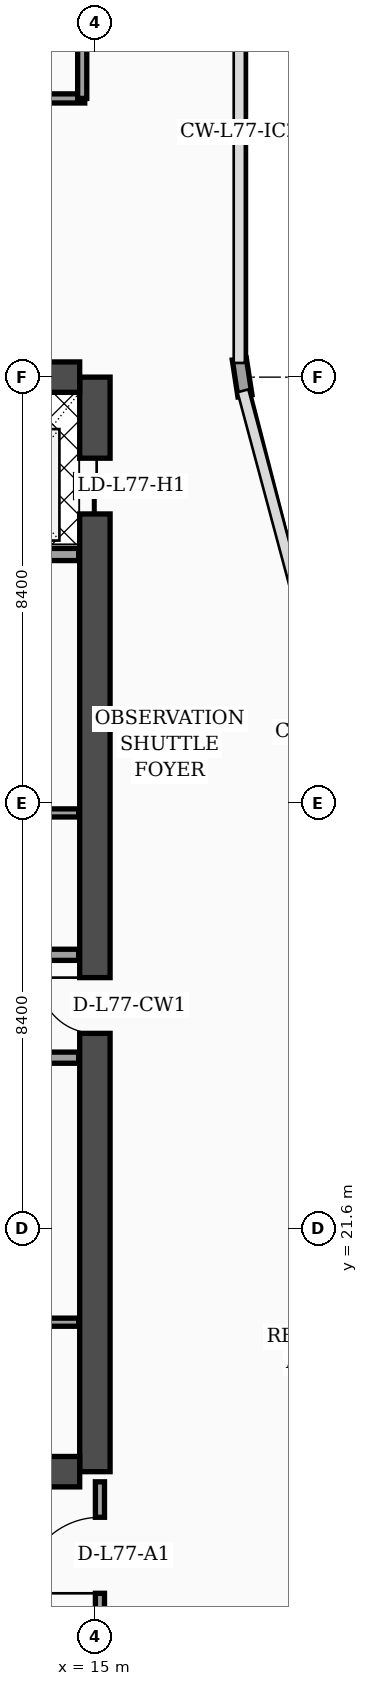
"""IFC4 building model, lengths in metres.
Left out: names, types, materials, properties, quantities, classifications, styles, units other than length and angle.
Written with IfcOpenShell. Run it as: python <this file> out.ifc"""

import sys

from ifc_helpers import new_model, si_unit, direction, frame, frame_2d, origin, place, context, subcontext, project, spatial, rectangle, extrude, element, fill, save


model = new_model("IFC4")
c1 = context("Model", 3, precision=1e-05, world=origin(), true_north=direction((0.0, 1.0)))
c2 = subcontext(c1, "Body", "Model", "MODEL_VIEW")
j1 = project(units=[si_unit("LENGTHUNIT", "METRE"), si_unit("PLANEANGLEUNIT", "RADIAN")], contexts=[c1])
p1 = place(None, origin())
s1 = spatial("IfcSite", under=j1, at=p1, CompositionType="ELEMENT")
p2 = place(p1, origin())
s2 = spatial("IfcBuilding", under=s1, at=p2, CompositionType="ELEMENT")
p3 = place(p2, frame((0.0, 0.0, 311.5)))
s3 = spatial("IfcBuildingStorey", under=s2, at=p3, CompositionType="ELEMENT", Elevation=311.5)
p4 = place(p3, frame((15.0, 16.8, 0.0), z_axis=(0.0, 0.0, 1.0), x_axis=(0.0, 1.0, 0.0)))
e1 = element("IfcWall", 1, at=p4, inside=s3, PredefinedType="SHEAR", context=c2, shape_type="SweptSolid", body=[
    extrude(rectangle(XDim=21.6, YDim=0.6, at=frame_2d((10.8, 0.0))), origin(), (0.0, 0.0, 1.0), 4.26),
])
p5 = place(p4, frame((8.65, 0.0, 0.0)))
e2 = element("IfcOpeningElement", 2, at=p5, cuts=e1, PredefinedType="OPENING", context=c2, shape_type="SweptSolid", body=[
    extrude(rectangle(XDim=1.1, YDim=2.2, at=frame_2d((0.55, 1.1))), frame((0.0, 0.31, 0.0), z_axis=(0.0, -1.0, 0.0), x_axis=(1.0, 0.0, 0.0)), (0.0, 0.0, 1.0), 0.62),
])
p6 = place(p4, frame((18.9, 0.0, 0.0)))
e3 = element("IfcOpeningElement", 3, at=p6, cuts=e1, PredefinedType="OPENING", context=c2, shape_type="SweptSolid", body=[
    extrude(rectangle(XDim=1.1, YDim=2.2, at=frame_2d((0.55, 1.1))), frame((0.0, 0.31, 0.0), z_axis=(0.0, -1.0, 0.0), x_axis=(1.0, 0.0, 0.0)), (0.0, 0.0, 1.0), 0.62),
])
p7 = place(p3, frame((4.5, 38.4, 0.0), z_axis=(0.0, 0.0, 1.0), x_axis=(1.0, 0.0, 0.0)))
e4 = element("IfcWall", 4, at=p7, inside=s3, PredefinedType="SHEAR", context=c2, shape_type="SweptSolid", body=[
    extrude(rectangle(XDim=10.2, YDim=0.6, at=frame_2d((5.1, 0.0))), origin(), (0.0, 0.0, 1.0), 4.26),
])
p8 = place(p7, frame((5.8, 0.0, 0.0)))
e5 = element("IfcOpeningElement", 5, at=p8, cuts=e4, PredefinedType="OPENING", context=c2, shape_type="SweptSolid", body=[
    extrude(rectangle(XDim=1.1, YDim=2.2, at=frame_2d((0.55, 1.1))), frame((0.0, 0.31, 0.0), z_axis=(0.0, -1.0, 0.0), x_axis=(1.0, 0.0, 0.0)), (0.0, 0.0, 1.0), 0.62),
])
p9 = place(p3, frame((4.5, 16.8, 0.0), z_axis=(0.0, 0.0, 1.0), x_axis=(1.0, 0.0, 0.0)))
e6 = element("IfcWall", 6, at=p9, inside=s3, PredefinedType="SHEAR", context=c2, shape_type="SweptSolid", body=[
    extrude(rectangle(XDim=10.2, YDim=0.6, at=frame_2d((5.1, 0.0))), origin(), (0.0, 0.0, 1.0), 4.26),
])
p10 = place(p3, frame((17.962, 38.03, 0.0), z_axis=(0.0, 0.0, 1.0), x_axis=(-0.15141125477, 0.988470855377, 0.0)))
e7 = element("IfcWall", 7, at=p10, inside=s3, PredefinedType="SOLIDWALL", context=c2, shape_type="SweptSolid", body=[
    extrude(rectangle(XDim=0.739, YDim=0.28, at=frame_2d((0.369, 0.0))), origin(), (0.0, 0.0, 1.0), 4.26),
])
p11 = place(p3, frame((9.68, 19.75, 0.0), z_axis=(0.0, 0.0, 1.0), x_axis=(1.0, 0.0, 0.0)))
e8 = element("IfcWall", 8, at=p11, inside=s3, PredefinedType="PARTITIONING", context=c2, shape_type="SweptSolid", body=[
    extrude(rectangle(XDim=5.0, YDim=0.16, at=frame_2d((2.5, 0.0))), origin(), (0.0, 0.0, 1.0), 4.26),
])
p12 = place(p11, frame((1.1, 0.0, 0.0)))
e9 = element("IfcOpeningElement", 9, at=p12, cuts=e8, PredefinedType="OPENING", context=c2, shape_type="SweptSolid", body=[
    extrude(rectangle(XDim=0.98, YDim=2.15, at=frame_2d((0.49, 1.075))), frame((0.0, 0.09, 0.0), z_axis=(0.0, -1.0, 0.0), x_axis=(1.0, 0.0, 0.0)), (0.0, 0.0, 1.0), 0.18),
])
p13 = place(p3, frame((9.68, 24.97, 0.0), z_axis=(0.0, 0.0, 1.0), x_axis=(1.0, 0.0, 0.0)))
e10 = element("IfcWall", 10, at=p13, inside=s3, PredefinedType="SOLIDWALL", context=c2, shape_type="SweptSolid", body=[
    extrude(rectangle(XDim=5.0, YDim=0.22, at=frame_2d((2.5, 0.0))), origin(), (0.0, 0.0, 1.0), 3.69),
])
p14 = place(p13, frame((0.9, 0.0, 0.0)))
e11 = element("IfcOpeningElement", 11, at=p14, cuts=e10, PredefinedType="OPENING", context=c2, shape_type="SweptSolid", body=[
    extrude(rectangle(XDim=0.98, YDim=2.15, at=frame_2d((0.49, 1.075))), frame((0.0, 0.12, 0.0), z_axis=(0.0, -1.0, 0.0), x_axis=(1.0, 0.0, 0.0)), (0.0, 0.0, 1.0), 0.24),
])
p15 = place(p3, frame((12.25, 27.0, 0.0), z_axis=(0.0, 0.0, 1.0), x_axis=(1.0, 0.0, 0.0)))
e12 = element("IfcWall", 12, at=p15, inside=s3, PredefinedType="SOLIDWALL", context=c2, shape_type="SweptSolid", body=[
    extrude(rectangle(XDim=2.43, YDim=0.22, at=frame_2d((1.215, 0.0))), origin(), (0.0, 0.0, 1.0), 4.26),
])
p16 = place(p3, frame((12.25, 29.8, 0.0), z_axis=(0.0, 0.0, 1.0), x_axis=(1.0, 0.0, 0.0)))
e13 = element("IfcWall", 13, at=p16, inside=s3, PredefinedType="PARTITIONING", context=c2, shape_type="SweptSolid", body=[
    extrude(rectangle(XDim=2.43, YDim=0.16, at=frame_2d((1.215, 0.0))), origin(), (0.0, 0.0, 1.0), 4.26),
])
p17 = place(p16, frame((0.55, 0.0, 0.0)))
e14 = element("IfcOpeningElement", 14, at=p17, cuts=e13, PredefinedType="OPENING", context=c2, shape_type="SweptSolid", body=[
    extrude(rectangle(XDim=0.98, YDim=2.15, at=frame_2d((0.49, 1.075))), frame((0.0, 0.09, 0.0), z_axis=(0.0, -1.0, 0.0), x_axis=(1.0, 0.0, 0.0)), (0.0, 0.0, 1.0), 0.18),
])
p18 = place(p3, frame((9.66, 34.9, 0.0), z_axis=(0.0, 0.0, 1.0), x_axis=(1.0, 0.0, 0.0)))
e15 = element("IfcWall", 15, at=p18, inside=s3, PredefinedType="SOLIDWALL", context=c2, shape_type="SweptSolid", body=[
    extrude(rectangle(XDim=5.02, YDim=0.24, at=frame_2d((2.51, 0.0))), origin(), (0.0, 0.0, 1.0), 4.26),
])
p19 = place(p3, frame((4.06, 43.9, 0.0), z_axis=(0.0, 0.0, 1.0), x_axis=(1.0, 0.0, 0.0)))
e16 = element("IfcWall", 16, at=p19, inside=s3, PredefinedType="PARTITIONING", context=c2, shape_type="SweptSolid", body=[
    extrude(rectangle(XDim=10.74, YDim=0.18, at=frame_2d((5.37, 0.0))), origin(), (0.0, 0.0, 1.0), 3.69),
])
p20 = place(p19, frame((0.55, 0.0, 0.0)))
e17 = element("IfcOpeningElement", 17, at=p20, cuts=e16, PredefinedType="OPENING", context=c2, shape_type="SweptSolid", body=[
    extrude(rectangle(XDim=1.02, YDim=2.2, at=frame_2d((0.51, 1.1))), frame((0.0, 0.1, 0.0), z_axis=(0.0, -1.0, 0.0), x_axis=(1.0, 0.0, 0.0)), (0.0, 0.0, 1.0), 0.2),
])
p21 = place(p19, frame((4.65, 0.0, 0.0)))
e18 = element("IfcOpeningElement", 18, at=p21, cuts=e16, PredefinedType="OPENING", context=c2, shape_type="SweptSolid", body=[
    extrude(rectangle(XDim=1.02, YDim=2.2, at=frame_2d((0.51, 1.1))), frame((0.0, 0.1, 0.0), z_axis=(0.0, -1.0, 0.0), x_axis=(1.0, 0.0, 0.0)), (0.0, 0.0, 1.0), 0.2),
])
p22 = place(p19, frame((8.4, 0.0, 0.0)))
e19 = element("IfcOpeningElement", 19, at=p22, cuts=e16, PredefinedType="OPENING", context=c2, shape_type="SweptSolid", body=[
    extrude(rectangle(XDim=1.02, YDim=2.2, at=frame_2d((0.51, 1.1))), frame((0.0, 0.1, 0.0), z_axis=(0.0, -1.0, 0.0), x_axis=(1.0, 0.0, 0.0)), (0.0, 0.0, 1.0), 0.2),
])
p23 = place(p3, frame((14.75, 43.9, 0.0), z_axis=(0.0, 0.0, 1.0), x_axis=(0.0, 1.0, 0.0)))
e20 = element("IfcWall", 20, at=p23, inside=s3, PredefinedType="PARTITIONING", context=c2, shape_type="SweptSolid", body=[
    extrude(rectangle(XDim=3.82, YDim=0.18, at=frame_2d((1.91, 0.0))), origin(), (0.0, 0.0, 1.0), 3.79),
])
p24 = place(p3, frame((15.1, 2.6, 0.0), z_axis=(0.0, 0.0, 1.0), x_axis=(0.0, 1.0, 0.0)))
e21 = element("IfcWall", 21, at=p24, inside=s3, PredefinedType="PARTITIONING", context=c2, shape_type="SweptSolid", body=[
    extrude(rectangle(XDim=14.0, YDim=0.18, at=frame_2d((7.0, 0.0))), origin(), (0.0, 0.0, 1.0), 3.29),
])
p25 = place(p24, frame((11.8, 0.0, 0.0)))
e22 = element("IfcOpeningElement", 22, at=p25, cuts=e21, PredefinedType="OPENING", context=c2, shape_type="SweptSolid", body=[
    extrude(rectangle(XDim=1.5, YDim=2.22, at=frame_2d((0.75, 1.11))), frame((0.0, 0.1, 0.0), z_axis=(0.0, -1.0, 0.0), x_axis=(1.0, 0.0, 0.0)), (0.0, 0.0, 1.0), 0.2),
])
p26 = place(p25, origin())
e23 = element("IfcDoor", 23, at=p26, inside=s3, OperationType="SINGLE_SWING_LEFT", PredefinedType="DOOR", context=c2, shape_type="SweptSolid", body=[
    extrude(rectangle(XDim=1.5, YDim=2.22, at=frame_2d((0.75, 1.11))), frame((0.0, 0.025, 0.0), z_axis=(0.0, -1.0, 0.0), x_axis=(1.0, 0.0, 0.0)), (0.0, 0.0, 1.0), 0.05),
])
fill(e22, e23)
p27 = place(p5, origin())
e24 = element("IfcDoor", 24, at=p27, inside=s3, OperationType="SINGLE_SWING_RIGHT", PredefinedType="DOOR", context=c2, shape_type="SweptSolid", body=[
    extrude(rectangle(XDim=1.1, YDim=2.2, at=frame_2d((0.55, 1.1))), frame((0.0, 0.025, 0.0), z_axis=(0.0, -1.0, 0.0), x_axis=(1.0, 0.0, 0.0)), (0.0, 0.0, 1.0), 0.05),
])
fill(e2, e24)
p28 = place(p6, origin())
e25 = element("IfcDoor", 25, at=p28, inside=s3, OperationType="DOUBLE_DOOR_SLIDING", PredefinedType="DOOR", context=c2, shape_type="SweptSolid", body=[
    extrude(rectangle(XDim=1.1, YDim=2.2, at=frame_2d((0.55, 1.1))), frame((0.0, 0.025, 0.0), z_axis=(0.0, -1.0, 0.0), x_axis=(1.0, 0.0, 0.0)), (0.0, 0.0, 1.0), 0.05),
])
fill(e3, e25)
save(model, sys.argv[1])
